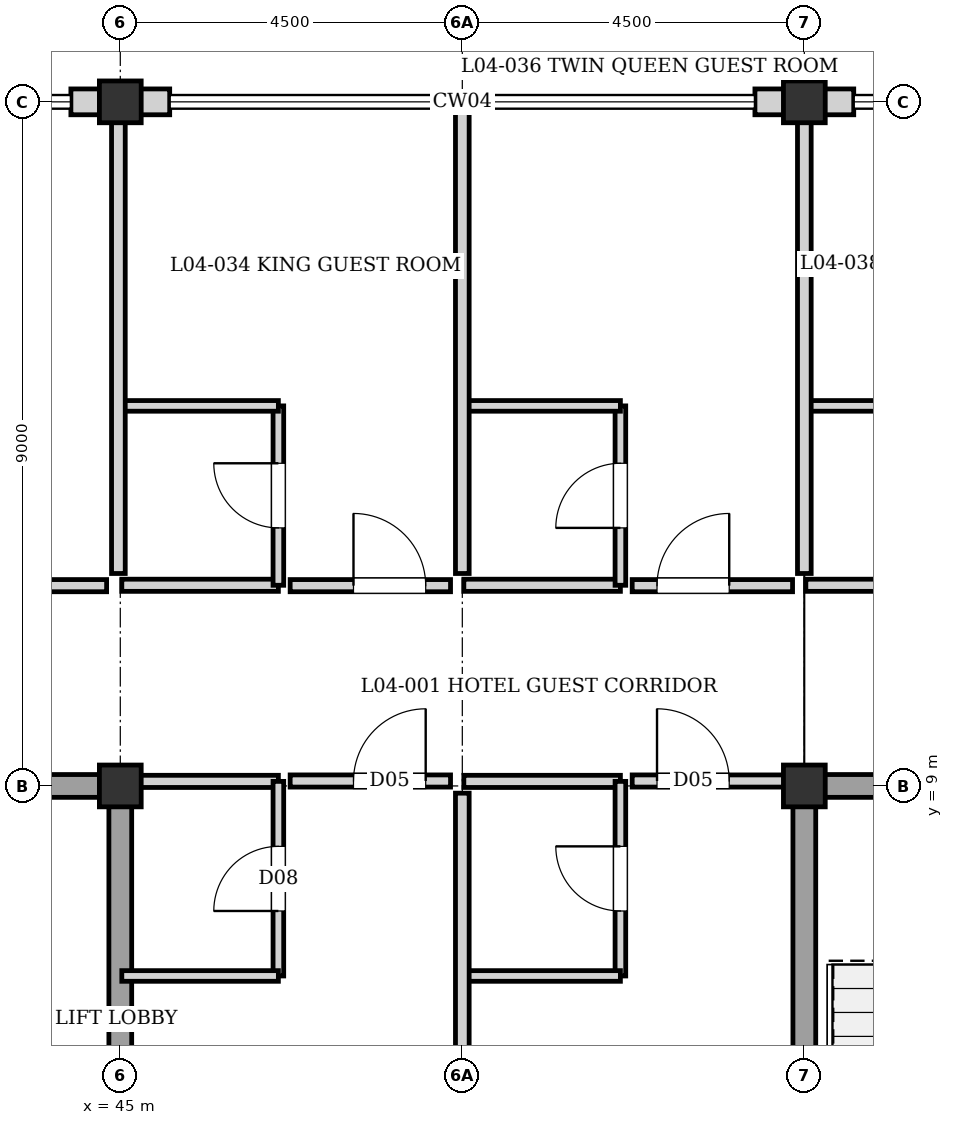
"""IFC4 building model, lengths in metres.
Left out: names, types, materials, properties, quantities, classifications, styles, units other than length and angle.
Written with IfcOpenShell. Run it as: python <this file> out.ifc"""

import sys

from ifc_helpers import new_model, si_unit, direction, frame, frame_2d, origin, origin_2d, place, context, subcontext, project, spatial, rectangle, extrude, element, fill, save


model = new_model("IFC4")
c1 = context("Model", 3, precision=1e-05, world=origin(), true_north=direction((0.0, 1.0)))
c2 = subcontext(c1, "Body", "Model", "MODEL_VIEW")
j1 = project(units=[si_unit("LENGTHUNIT", "METRE"), si_unit("PLANEANGLEUNIT", "RADIAN")], contexts=[c1])
p1 = place(None, origin())
s1 = spatial("IfcSite", under=j1, at=p1, CompositionType="ELEMENT")
p2 = place(p1, origin())
s2 = spatial("IfcBuilding", under=s1, at=p2, CompositionType="ELEMENT")
p3 = place(p2, frame((0.0, 0.0, 14.56)))
s3 = spatial("IfcBuildingStorey", under=s2, at=p3, CompositionType="ELEMENT", Elevation=14.56)
for number, where, z_axis, x_axis in (
    (1, (45.0, 9.0, 0.0), (0.0, 0.0, 1.0), (1.0, 0.0, 0.0)),
    (2, (45.0, 18.0, 0.0), (0.0, 0.0, 1.0), (1.0, 0.0, 0.0)),
    (3, (54.0, 9.0, 0.0), (0.0, 0.0, 1.0), (1.0, 0.0, 0.0)),
    (4, (54.0, 18.0, 0.0), (0.0, 0.0, 1.0), (1.0, 0.0, 0.0)),
):
    element("IfcColumn", number, at=place(p3, frame(where, z_axis=z_axis, x_axis=x_axis)), inside=s3, PredefinedType="COLUMN", context=c2, shape_type="SweptSolid", body=[
        extrude(rectangle(XDim=0.55, YDim=0.55, at=origin_2d()), origin(), (0.0, 0.0, 1.0), 3.04),
    ])
p4 = place(p3, frame((44.35, 18.0, 0.0), z_axis=(0.0, 0.0, 1.0), x_axis=(1.0, 0.0, 0.0)))
e5 = element("IfcWall", 5, at=p4, inside=s3, PredefinedType="SOLIDWALL", context=c2, shape_type="SweptSolid", body=[
    extrude(rectangle(XDim=0.65, YDim=0.34, at=frame_2d((0.325, 0.0))), origin(), (0.0, 0.0, 1.0), 2.42),
])
for number, where, z_axis, x_axis in (
    (6, (45.0, 18.0, 0.0), (0.0, 0.0, 1.0), (1.0, 0.0, 0.0)),
    (7, (53.35, 18.0, 0.0), (0.0, 0.0, 1.0), (1.0, 0.0, 0.0)),
):
    element("IfcWall", number, at=place(p3, frame(where, z_axis=z_axis, x_axis=x_axis)), inside=s3, PredefinedType="SOLIDWALL", context=c2, shape_type="SweptSolid", body=[
        extrude(rectangle(XDim=0.65, YDim=0.34, at=frame_2d((0.325, 0.0))), origin(), (0.0, 0.0, 1.0), 2.38),
    ])
p5 = place(p3, frame((54.0, 18.0, 0.0), z_axis=(0.0, 0.0, 1.0), x_axis=(1.0, 0.0, 0.0)))
e8 = element("IfcWall", 8, at=p5, inside=s3, PredefinedType="SOLIDWALL", context=c2, shape_type="SweptSolid", body=[
    extrude(rectangle(XDim=0.65, YDim=0.34, at=frame_2d((0.325, 0.0))), origin(), (0.0, 0.0, 1.0), 2.55),
])
p6 = place(p3, frame((45.0, 0.0, 0.0), z_axis=(0.0, 0.0, 1.0), x_axis=(0.0, 1.0, 0.0)))
e9 = element("IfcWall", 9, at=p6, inside=s3, PredefinedType="SHEAR", context=c2, shape_type="SweptSolid", body=[
    extrude(rectangle(XDim=9.0, YDim=0.3, at=frame_2d((4.5, 0.0))), origin(), (0.0, 0.0, 1.0), 2.82),
])
p7 = place(p3, frame((36.0, 9.0, 0.0), z_axis=(0.0, 0.0, 1.0), x_axis=(1.0, 0.0, 0.0)))
e10 = element("IfcWall", 10, at=p7, inside=s3, PredefinedType="SHEAR", context=c2, shape_type="SweptSolid", body=[
    extrude(rectangle(XDim=9.0, YDim=0.3, at=frame_2d((4.5, 0.0))), origin(), (0.0, 0.0, 1.0), 2.82),
])
p8 = place(p7, frame((5.95, 0.0, 0.0)))
e11 = element("IfcOpeningElement", 11, at=p8, cuts=e10, PredefinedType="OPENING", context=c2, shape_type="SweptSolid", body=[
    extrude(rectangle(XDim=1.6, YDim=2.1, at=frame_2d((0.8, 1.05))), frame((0.0, 0.16, 0.0), z_axis=(0.0, -1.0, 0.0), x_axis=(1.0, 0.0, 0.0)), (0.0, 0.0, 1.0), 0.32),
])
p9 = place(p3, frame((54.0, 9.0, 0.0), z_axis=(0.0, 0.0, 1.0), x_axis=(1.0, 0.0, 0.0)))
e12 = element("IfcWall", 12, at=p9, inside=s3, PredefinedType="SHEAR", context=c2, shape_type="SweptSolid", body=[
    extrude(rectangle(XDim=9.0, YDim=0.3, at=frame_2d((4.5, 0.0))), origin(), (0.0, 0.0, 1.0), 2.82),
])
p10 = place(p9, frame((6.05, 0.0, 0.0)))
e13 = element("IfcOpeningElement", 13, at=p10, cuts=e12, PredefinedType="OPENING", context=c2, shape_type="SweptSolid", body=[
    extrude(rectangle(XDim=1.4, YDim=2.02, at=frame_2d((0.7, 1.01))), frame((0.0, 0.16, 0.0), z_axis=(0.0, -1.0, 0.0), x_axis=(1.0, 0.0, 0.0)), (0.0, 0.0, 1.0), 0.32),
])
p11 = place(p3, frame((54.0, 0.0, 0.0), z_axis=(0.0, 0.0, 1.0), x_axis=(0.0, 1.0, 0.0)))
e14 = element("IfcWall", 14, at=p11, inside=s3, PredefinedType="SHEAR", context=c2, shape_type="SweptSolid", body=[
    extrude(rectangle(XDim=9.0, YDim=0.3, at=frame_2d((4.5, 0.0))), origin(), (0.0, 0.0, 1.0), 2.82),
])
p12 = place(p3, frame((45.02, 9.06, 0.0), z_axis=(0.0, 0.0, 1.0), x_axis=(1.0, 0.0, 0.0)))
e15 = element("IfcWall", 15, at=p12, inside=s3, PredefinedType="PARTITIONING", context=c2, shape_type="SweptSolid", body=[
    extrude(rectangle(XDim=2.06, YDim=0.16, at=frame_2d((1.03, 0.0))), origin(), (0.0, 0.0, 1.0), 2.42),
])
p13 = place(p3, frame((47.08, 6.5, 0.0), z_axis=(0.0, 0.0, 1.0), x_axis=(0.0, 1.0, 0.0)))
e16 = element("IfcWall", 16, at=p13, inside=s3, PredefinedType="PLUMBINGWALL", context=c2, shape_type="SweptSolid", body=[
    extrude(rectangle(XDim=2.56, YDim=0.14, at=frame_2d((1.28, 0.0))), origin(), (0.0, 0.0, 1.0), 2.82),
])
p14 = place(p13, frame((0.855, 0.0, 0.0)))
e17 = element("IfcOpeningElement", 17, at=p14, cuts=e16, PredefinedType="OPENING", context=c2, shape_type="SweptSolid", body=[
    extrude(rectangle(XDim=0.85, YDim=2.04, at=frame_2d((0.425, 1.02))), frame((0.0, 0.08, 0.0), z_axis=(0.0, -1.0, 0.0), x_axis=(1.0, 0.0, 0.0)), (0.0, 0.0, 1.0), 0.16),
])
p15 = place(p3, frame((45.02, 6.5, 0.0), z_axis=(0.0, 0.0, 1.0), x_axis=(1.0, 0.0, 0.0)))
e18 = element("IfcWall", 18, at=p15, inside=s3, PredefinedType="PLUMBINGWALL", context=c2, shape_type="SweptSolid", body=[
    extrude(rectangle(XDim=2.06, YDim=0.14, at=frame_2d((1.03, 0.0))), origin(), (0.0, 0.0, 1.0), 2.82),
])
p16 = place(p3, frame((49.52, 9.06, 0.0), z_axis=(0.0, 0.0, 1.0), x_axis=(1.0, 0.0, 0.0)))
e19 = element("IfcWall", 19, at=p16, inside=s3, PredefinedType="PARTITIONING", context=c2, shape_type="SweptSolid", body=[
    extrude(rectangle(XDim=2.06, YDim=0.16, at=frame_2d((1.03, 0.0))), origin(), (0.0, 0.0, 1.0), 2.42),
])
p17 = place(p3, frame((51.58, 6.5, 0.0), z_axis=(0.0, 0.0, 1.0), x_axis=(0.0, 1.0, 0.0)))
e20 = element("IfcWall", 20, at=p17, inside=s3, PredefinedType="PLUMBINGWALL", context=c2, shape_type="SweptSolid", body=[
    extrude(rectangle(XDim=2.56, YDim=0.14, at=frame_2d((1.28, 0.0))), origin(), (0.0, 0.0, 1.0), 2.82),
])
p18 = place(p17, frame((0.855, 0.0, 0.0)))
e21 = element("IfcOpeningElement", 21, at=p18, cuts=e20, PredefinedType="OPENING", context=c2, shape_type="SweptSolid", body=[
    extrude(rectangle(XDim=0.85, YDim=2.04, at=frame_2d((0.425, 1.02))), frame((0.0, 0.08, 0.0), z_axis=(0.0, -1.0, 0.0), x_axis=(1.0, 0.0, 0.0)), (0.0, 0.0, 1.0), 0.16),
])
p19 = place(p3, frame((49.52, 6.5, 0.0), z_axis=(0.0, 0.0, 1.0), x_axis=(1.0, 0.0, 0.0)))
e22 = element("IfcWall", 22, at=p19, inside=s3, PredefinedType="PLUMBINGWALL", context=c2, shape_type="SweptSolid", body=[
    extrude(rectangle(XDim=2.06, YDim=0.14, at=frame_2d((1.03, 0.0))), origin(), (0.0, 0.0, 1.0), 2.82),
])
p20 = place(p3, frame((45.02, 11.64, 0.0), z_axis=(0.0, 0.0, 1.0), x_axis=(1.0, 0.0, 0.0)))
e23 = element("IfcWall", 23, at=p20, inside=s3, PredefinedType="PARTITIONING", context=c2, shape_type="SweptSolid", body=[
    extrude(rectangle(XDim=2.06, YDim=0.16, at=frame_2d((1.03, 0.0))), origin(), (0.0, 0.0, 1.0), 2.82),
])
p21 = place(p3, frame((47.08, 11.64, 0.0), z_axis=(0.0, 0.0, 1.0), x_axis=(0.0, 1.0, 0.0)))
e24 = element("IfcWall", 24, at=p21, inside=s3, PredefinedType="PLUMBINGWALL", context=c2, shape_type="SweptSolid", body=[
    extrude(rectangle(XDim=2.36, YDim=0.14, at=frame_2d((1.18, 0.0))), origin(), (0.0, 0.0, 1.0), 2.82),
])
p22 = place(p21, frame((0.755, 0.0, 0.0)))
e25 = element("IfcOpeningElement", 25, at=p22, cuts=e24, PredefinedType="OPENING", context=c2, shape_type="SweptSolid", body=[
    extrude(rectangle(XDim=0.85, YDim=2.04, at=frame_2d((0.425, 1.02))), frame((0.0, 0.08, 0.0), z_axis=(0.0, -1.0, 0.0), x_axis=(1.0, 0.0, 0.0)), (0.0, 0.0, 1.0), 0.16),
])
p23 = place(p3, frame((45.02, 14.0, 0.0), z_axis=(0.0, 0.0, 1.0), x_axis=(1.0, 0.0, 0.0)))
e26 = element("IfcWall", 26, at=p23, inside=s3, PredefinedType="PLUMBINGWALL", context=c2, shape_type="SweptSolid", body=[
    extrude(rectangle(XDim=2.06, YDim=0.14, at=frame_2d((1.03, 0.0))), origin(), (0.0, 0.0, 1.0), 2.82),
])
p24 = place(p3, frame((49.52, 11.64, 0.0), z_axis=(0.0, 0.0, 1.0), x_axis=(1.0, 0.0, 0.0)))
e27 = element("IfcWall", 27, at=p24, inside=s3, PredefinedType="PARTITIONING", context=c2, shape_type="SweptSolid", body=[
    extrude(rectangle(XDim=2.06, YDim=0.16, at=frame_2d((1.03, 0.0))), origin(), (0.0, 0.0, 1.0), 2.82),
])
p25 = place(p3, frame((51.58, 11.64, 0.0), z_axis=(0.0, 0.0, 1.0), x_axis=(0.0, 1.0, 0.0)))
e28 = element("IfcWall", 28, at=p25, inside=s3, PredefinedType="PLUMBINGWALL", context=c2, shape_type="SweptSolid", body=[
    extrude(rectangle(XDim=2.36, YDim=0.14, at=frame_2d((1.18, 0.0))), origin(), (0.0, 0.0, 1.0), 2.82),
])
p26 = place(p25, frame((0.755, 0.0, 0.0)))
e29 = element("IfcOpeningElement", 29, at=p26, cuts=e28, PredefinedType="OPENING", context=c2, shape_type="SweptSolid", body=[
    extrude(rectangle(XDim=0.85, YDim=2.04, at=frame_2d((0.425, 1.02))), frame((0.0, 0.08, 0.0), z_axis=(0.0, -1.0, 0.0), x_axis=(1.0, 0.0, 0.0)), (0.0, 0.0, 1.0), 0.16),
])
p27 = place(p3, frame((49.52, 14.0, 0.0), z_axis=(0.0, 0.0, 1.0), x_axis=(1.0, 0.0, 0.0)))
e30 = element("IfcWall", 30, at=p27, inside=s3, PredefinedType="PLUMBINGWALL", context=c2, shape_type="SweptSolid", body=[
    extrude(rectangle(XDim=2.06, YDim=0.14, at=frame_2d((1.03, 0.0))), origin(), (0.0, 0.0, 1.0), 2.82),
])
p28 = place(p3, frame((54.02, 11.64, 0.0), z_axis=(0.0, 0.0, 1.0), x_axis=(1.0, 0.0, 0.0)))
e31 = element("IfcWall", 31, at=p28, inside=s3, PredefinedType="PARTITIONING", context=c2, shape_type="SweptSolid", body=[
    extrude(rectangle(XDim=2.06, YDim=0.16, at=frame_2d((1.03, 0.0))), origin(), (0.0, 0.0, 1.0), 2.82),
])
p29 = place(p3, frame((54.02, 14.0, 0.0), z_axis=(0.0, 0.0, 1.0), x_axis=(1.0, 0.0, 0.0)))
e32 = element("IfcWall", 32, at=p29, inside=s3, PredefinedType="PLUMBINGWALL", context=c2, shape_type="SweptSolid", body=[
    extrude(rectangle(XDim=2.06, YDim=0.14, at=frame_2d((1.03, 0.0))), origin(), (0.0, 0.0, 1.0), 2.82),
])
p30 = place(p3, frame((49.5, 0.195, 0.0), z_axis=(0.0, 0.0, 1.0), x_axis=(0.0, 1.0, 0.0)))
e33 = element("IfcWall", 33, at=p30, inside=s3, PredefinedType="PARTITIONING", context=c2, shape_type="SweptSolid", body=[
    extrude(rectangle(XDim=8.71, YDim=0.18, at=frame_2d((4.355, 0.0))), origin(), (0.0, 0.0, 1.0), 2.82),
])
p31 = place(p3, frame((44.975, 11.795, 0.0), z_axis=(0.0, 0.0, 1.0), x_axis=(0.0, 1.0, 0.0)))
e34 = element("IfcWall", 34, at=p31, inside=s3, PredefinedType="PARTITIONING", context=c2, shape_type="SweptSolid", body=[
    extrude(rectangle(XDim=6.03, YDim=0.18, at=frame_2d((3.015, 0.0))), origin(), (0.0, 0.0, 1.0), 2.19),
])
p32 = place(p3, frame((49.5, 11.795, 0.0), z_axis=(0.0, 0.0, 1.0), x_axis=(0.0, 1.0, 0.0)))
e35 = element("IfcWall", 35, at=p32, inside=s3, PredefinedType="PARTITIONING", context=c2, shape_type="SweptSolid", body=[
    extrude(rectangle(XDim=6.11, YDim=0.18, at=frame_2d((3.055, 0.0))), origin(), (0.0, 0.0, 1.0), 2.82),
])
p33 = place(p3, frame((54.0, 11.795, 0.0), z_axis=(0.0, 0.0, 1.0), x_axis=(0.0, 1.0, 0.0)))
e36 = element("IfcWall", 36, at=p33, inside=s3, PredefinedType="PARTITIONING", context=c2, shape_type="SweptSolid", body=[
    extrude(rectangle(XDim=6.03, YDim=0.18, at=frame_2d((3.015, 0.0))), origin(), (0.0, 0.0, 1.0), 2.82),
])
p34 = place(p3, frame((47.235, 9.065, 0.0), z_axis=(0.0, 0.0, 1.0), x_axis=(1.0, 0.0, 0.0)))
e37 = element("IfcWall", 37, at=p34, inside=s3, PredefinedType="PARTITIONING", context=c2, shape_type="SweptSolid", body=[
    extrude(rectangle(XDim=2.11, YDim=0.16, at=frame_2d((1.055, 0.0))), origin(), (0.0, 0.0, 1.0), 2.42),
])
p35 = place(p34, frame((0.833, 0.0, 0.0)))
e38 = element("IfcOpeningElement", 38, at=p35, cuts=e37, PredefinedType="OPENING", context=c2, shape_type="SweptSolid", body=[
    extrude(rectangle(XDim=0.95, YDim=2.15, at=frame_2d((0.475, 1.075))), frame((0.0, 0.09, 0.0), z_axis=(0.0, -1.0, 0.0), x_axis=(1.0, 0.0, 0.0)), (0.0, 0.0, 1.0), 0.18),
])
p36 = place(p3, frame((51.735, 9.065, 0.0), z_axis=(0.0, 0.0, 1.0), x_axis=(1.0, 0.0, 0.0)))
e39 = element("IfcWall", 39, at=p36, inside=s3, PredefinedType="PARTITIONING", context=c2, shape_type="SweptSolid", body=[
    extrude(rectangle(XDim=2.11, YDim=0.16, at=frame_2d((1.055, 0.0))), origin(), (0.0, 0.0, 1.0), 2.42),
])
p37 = place(p36, frame((0.327, 0.0, 0.0)))
e40 = element("IfcOpeningElement", 40, at=p37, cuts=e39, PredefinedType="OPENING", context=c2, shape_type="SweptSolid", body=[
    extrude(rectangle(XDim=0.95, YDim=2.15, at=frame_2d((0.475, 1.075))), frame((0.0, 0.09, 0.0), z_axis=(0.0, -1.0, 0.0), x_axis=(1.0, 0.0, 0.0)), (0.0, 0.0, 1.0), 0.18),
])
p38 = place(p3, frame((38.235, 11.635, 0.0), z_axis=(0.0, 0.0, 1.0), x_axis=(1.0, 0.0, 0.0)))
e41 = element("IfcWall", 41, at=p38, inside=s3, PredefinedType="PARTITIONING", context=c2, shape_type="SweptSolid", body=[
    extrude(rectangle(XDim=6.585, YDim=0.16, at=frame_2d((3.292, 0.0))), origin(), (0.0, 0.0, 1.0), 2.82),
])
p39 = place(p38, frame((1.75, 0.0, 0.0)))
e42 = element("IfcOpeningElement", 42, at=p39, cuts=e41, PredefinedType="OPENING", context=c2, shape_type="SweptSolid", body=[
    extrude(rectangle(XDim=1.3, YDim=2.25, at=frame_2d((0.65, 1.125))), frame((0.0, 0.09, 0.0), z_axis=(0.0, -1.0, 0.0), x_axis=(1.0, 0.0, 0.0)), (0.0, 0.0, 1.0), 0.18),
])
p40 = place(p3, frame((47.235, 11.635, 0.0), z_axis=(0.0, 0.0, 1.0), x_axis=(1.0, 0.0, 0.0)))
e43 = element("IfcWall", 43, at=p40, inside=s3, PredefinedType="PARTITIONING", context=c2, shape_type="SweptSolid", body=[
    extrude(rectangle(XDim=2.11, YDim=0.16, at=frame_2d((1.055, 0.0))), origin(), (0.0, 0.0, 1.0), 2.82),
])
p41 = place(p40, frame((0.833, 0.0, 0.0)))
e44 = element("IfcOpeningElement", 44, at=p41, cuts=e43, PredefinedType="OPENING", context=c2, shape_type="SweptSolid", body=[
    extrude(rectangle(XDim=0.95, YDim=2.15, at=frame_2d((0.475, 1.075))), frame((0.0, 0.09, 0.0), z_axis=(0.0, -1.0, 0.0), x_axis=(1.0, 0.0, 0.0)), (0.0, 0.0, 1.0), 0.18),
])
p42 = place(p3, frame((51.735, 11.635, 0.0), z_axis=(0.0, 0.0, 1.0), x_axis=(1.0, 0.0, 0.0)))
e45 = element("IfcWall", 45, at=p42, inside=s3, PredefinedType="PARTITIONING", context=c2, shape_type="SweptSolid", body=[
    extrude(rectangle(XDim=2.11, YDim=0.16, at=frame_2d((1.055, 0.0))), origin(), (0.0, 0.0, 1.0), 2.82),
])
p43 = place(p42, frame((0.327, 0.0, 0.0)))
e46 = element("IfcOpeningElement", 46, at=p43, cuts=e45, PredefinedType="OPENING", context=c2, shape_type="SweptSolid", body=[
    extrude(rectangle(XDim=0.95, YDim=2.15, at=frame_2d((0.475, 1.075))), frame((0.0, 0.09, 0.0), z_axis=(0.0, -1.0, 0.0), x_axis=(1.0, 0.0, 0.0)), (0.0, 0.0, 1.0), 0.18),
])
p44 = place(p14, origin())
e47 = element("IfcDoor", 47, at=p44, inside=s3, OperationType="SINGLE_SWING_LEFT", PredefinedType="DOOR", context=c2, shape_type="SweptSolid", body=[
    extrude(rectangle(XDim=0.85, YDim=2.04, at=frame_2d((0.425, 1.02))), frame((0.0, 0.025, 0.0), z_axis=(0.0, -1.0, 0.0), x_axis=(1.0, 0.0, 0.0)), (0.0, 0.0, 1.0), 0.05),
])
fill(e17, e47)
p45 = place(p18, origin())
e48 = element("IfcDoor", 48, at=p45, inside=s3, OperationType="SINGLE_SWING_RIGHT", PredefinedType="DOOR", context=c2, shape_type="SweptSolid", body=[
    extrude(rectangle(XDim=0.85, YDim=2.04, at=frame_2d((0.425, 1.02))), frame((0.0, 0.025, 0.0), z_axis=(0.0, -1.0, 0.0), x_axis=(1.0, 0.0, 0.0)), (0.0, 0.0, 1.0), 0.05),
])
fill(e21, e48)
p46 = place(p22, origin())
e49 = element("IfcDoor", 49, at=p46, inside=s3, OperationType="SINGLE_SWING_RIGHT", PredefinedType="DOOR", context=c2, shape_type="SweptSolid", body=[
    extrude(rectangle(XDim=0.85, YDim=2.04, at=frame_2d((0.425, 1.02))), frame((0.0, 0.025, 0.0), z_axis=(0.0, -1.0, 0.0), x_axis=(1.0, 0.0, 0.0)), (0.0, 0.0, 1.0), 0.05),
])
fill(e25, e49)
p47 = place(p26, origin())
e50 = element("IfcDoor", 50, at=p47, inside=s3, OperationType="SINGLE_SWING_LEFT", PredefinedType="DOOR", context=c2, shape_type="SweptSolid", body=[
    extrude(rectangle(XDim=0.85, YDim=2.04, at=frame_2d((0.425, 1.02))), frame((0.0, 0.025, 0.0), z_axis=(0.0, -1.0, 0.0), x_axis=(1.0, 0.0, 0.0)), (0.0, 0.0, 1.0), 0.05),
])
fill(e29, e50)
p48 = place(p35, origin())
e51 = element("IfcDoor", 51, at=p48, inside=s3, OperationType="SINGLE_SWING_RIGHT", PredefinedType="DOOR", context=c2, shape_type="SweptSolid", body=[
    extrude(rectangle(XDim=0.95, YDim=2.15, at=frame_2d((0.475, 1.075))), frame((0.0, 0.025, 0.0), z_axis=(0.0, -1.0, 0.0), x_axis=(1.0, 0.0, 0.0)), (0.0, 0.0, 1.0), 0.05),
])
fill(e38, e51)
p49 = place(p37, origin())
e52 = element("IfcDoor", 52, at=p49, inside=s3, OperationType="SINGLE_SWING_LEFT", PredefinedType="DOOR", context=c2, shape_type="SweptSolid", body=[
    extrude(rectangle(XDim=0.95, YDim=2.15, at=frame_2d((0.475, 1.075))), frame((0.0, 0.025, 0.0), z_axis=(0.0, -1.0, 0.0), x_axis=(1.0, 0.0, 0.0)), (0.0, 0.0, 1.0), 0.05),
])
fill(e40, e52)
p50 = place(p41, origin())
e53 = element("IfcDoor", 53, at=p50, inside=s3, OperationType="SINGLE_SWING_LEFT", PredefinedType="DOOR", context=c2, shape_type="SweptSolid", body=[
    extrude(rectangle(XDim=0.95, YDim=2.15, at=frame_2d((0.475, 1.075))), frame((0.0, 0.025, 0.0), z_axis=(0.0, -1.0, 0.0), x_axis=(1.0, 0.0, 0.0)), (0.0, 0.0, 1.0), 0.05),
])
fill(e44, e53)
p51 = place(p43, origin())
e54 = element("IfcDoor", 54, at=p51, inside=s3, OperationType="SINGLE_SWING_RIGHT", PredefinedType="DOOR", context=c2, shape_type="SweptSolid", body=[
    extrude(rectangle(XDim=0.95, YDim=2.15, at=frame_2d((0.475, 1.075))), frame((0.0, 0.025, 0.0), z_axis=(0.0, -1.0, 0.0), x_axis=(1.0, 0.0, 0.0)), (0.0, 0.0, 1.0), 0.05),
])
fill(e46, e54)
save(model, sys.argv[1])
